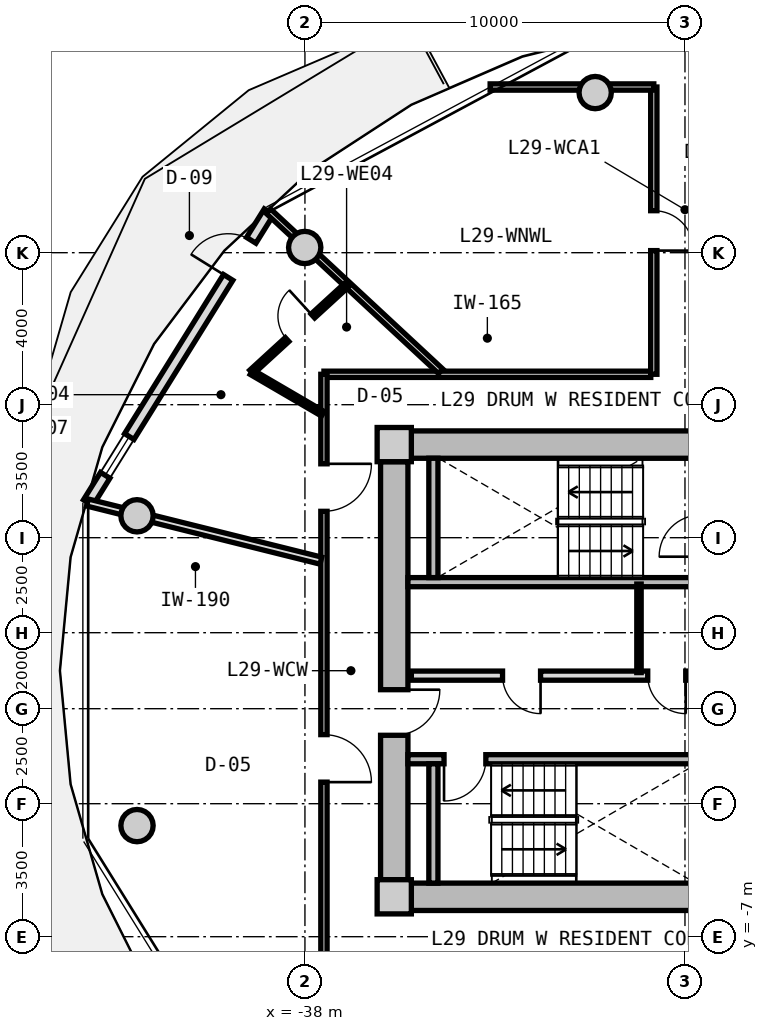
"""IFC4 building model, lengths in metres.
Left out: names, types, materials, properties, quantities, classifications, styles, units other than length and angle.
Written with IfcOpenShell. Run it as: python <this file> out.ifc"""

import sys

from ifc_helpers import new_model, si_unit, direction, frame, frame_2d, origin, origin_2d, place, context, subcontext, project, spatial, rectangle, circle, extrude, source, transform, mapped, element, fill, save


model = new_model("IFC4")
c1 = context("Model", 3, precision=1e-05, world=origin(), true_north=direction((0.0, 1.0)))
c2 = subcontext(c1, "Body", "Model", "MODEL_VIEW")
j1 = project(units=[si_unit("LENGTHUNIT", "METRE"), si_unit("PLANEANGLEUNIT", "RADIAN")], contexts=[c1])
p1 = place(None, origin())
s1 = spatial("IfcSite", under=j1, at=p1, CompositionType="ELEMENT")
p2 = place(p1, origin())
s2 = spatial("IfcBuilding", under=s1, at=p2, CompositionType="ELEMENT")
p3 = place(p2, frame((0.0, 0.0, 96.25)))
s3 = spatial("IfcBuildingStorey", under=s2, at=p3, CompositionType="ELEMENT", Elevation=96.25)
m1 = source(origin(), c2, "Body", "SweptSolid", [
    extrude(rectangle(XDim=0.9, YDim=0.9, at=origin_2d()), origin(), (0.0, 0.0, 1.0), 3.05),
])
for number, where, z_axis, x_axis in (
    (1, (-35.65, -5.95, 0.0), (0.0, 0.0, 1.0), (1.0, 0.0, 0.0)),
    (2, (-35.65, 5.95, 0.0), (0.0, 0.0, 1.0), (1.0, 0.0, 0.0)),
):
    element("IfcColumn", number, at=place(p3, frame(where, z_axis=z_axis, x_axis=x_axis)), inside=s3, PredefinedType="COLUMN", context=c2, shape_type="MappedRepresentation", body=[
        mapped(m1, transform((0.0, 0.0, 0.0), x_axis=(1.0, 0.0, 0.0), y_axis=(0.0, 1.0, 0.0), z_axis=(0.0, 0.0, 1.0), scale=1.0)),
    ])
m2 = source(origin(), c2, "Body", "SweptSolid", [
    extrude(rectangle(XDim=14.4, YDim=0.72, at=frame_2d((7.2, 0.0))), origin(), (0.0, 0.0, 1.0), 2.79),
])
for number, where, z_axis, x_axis in (
    (3, (-35.2, 5.95, 0.0), (0.0, 0.0, 1.0), (1.0, 0.0, 0.0)),
    (4, (-20.8, -5.95, 0.0), (0.0, 0.0, 1.0), (-1.0, 0.0, 0.0)),
):
    element("IfcWall", number, at=place(p3, frame(where, z_axis=z_axis, x_axis=x_axis)), inside=s3, PredefinedType="SHEAR", context=c2, shape_type="MappedRepresentation", body=[
        mapped(m2, transform((0.0, 0.0, 0.0), x_axis=(1.0, 0.0, 0.0), y_axis=(0.0, 1.0, 0.0), z_axis=(0.0, 0.0, 1.0), scale=1.0)),
    ])
m3 = source(origin(), c2, "Body", "SweptSolid", [
    extrude(rectangle(XDim=11.0, YDim=0.72, at=frame_2d((5.5, 0.0))), origin(), (0.0, 0.0, 1.0), 2.79),
])
p4 = place(p3, frame((-35.65, -5.5, 0.0), z_axis=(0.0, 0.0, 1.0), x_axis=(0.0, 1.0, 0.0)))
e5 = element("IfcWall", 5, at=p4, inside=s3, PredefinedType="SHEAR", context=c2, shape_type="MappedRepresentation", body=[
    mapped(m3, transform((0.0, 0.0, 0.0), x_axis=(1.0, 0.0, 0.0), y_axis=(0.0, 1.0, 0.0), z_axis=(0.0, 0.0, 1.0), scale=1.0)),
])
p5 = place(p4, frame((3.8, 0.0, 0.0)))
e6 = element("IfcOpeningElement", 6, at=p5, cuts=e5, PredefinedType="OPENING", context=c2, shape_type="SweptSolid", body=[
    extrude(rectangle(XDim=1.2, YDim=2.15, at=frame_2d((0.6, 1.075))), frame((0.0, 0.37, 0.0), z_axis=(0.0, -1.0, 0.0), x_axis=(1.0, 0.0, 0.0)), (0.0, 0.0, 1.0), 0.74),
])
m4 = source(origin(), c2, "Body", "SweptSolid", [
    extrude(circle(Radius=0.425, at=origin_2d()), origin(), (0.0, 0.0, 1.0), 3.05),
])
for number, where, z_axis, x_axis in (
    (7, (-30.363, 15.213, 0.0), (0.0, 0.0, 1.0), (1.0, 0.0, 0.0)),
    (8, (-38.006, 11.137, 0.0), (0.0, 0.0, 1.0), (1.0, 0.0, 0.0)),
    (9, (-42.419, 4.076, 0.0), (0.0, 0.0, 1.0), (1.0, 0.0, 0.0)),
    (10, (-42.419, -4.076, 0.0), (0.0, 0.0, 1.0), (1.0, 0.0, 0.0)),
):
    element("IfcColumn", number, at=place(p3, frame(where, z_axis=z_axis, x_axis=x_axis)), inside=s3, PredefinedType="COLUMN", context=c2, shape_type="MappedRepresentation", body=[
        mapped(m4, transform((0.0, 0.0, 0.0), x_axis=(1.0, 0.0, 0.0), y_axis=(0.0, 1.0, 0.0), z_axis=(0.0, 0.0, 1.0), scale=1.0)),
    ])
m5 = source(origin(), c2, "Body", "SweptSolid", [
    extrude(rectangle(XDim=9.014, YDim=0.29, at=frame_2d((4.507, 0.0))), origin(), (0.0, 0.0, 1.0), 2.79),
])
p6 = place(p3, frame((-43.704, 4.421, 0.0), z_axis=(0.0, 0.0, 1.0), x_axis=(0.527732945084, 0.849410347637, 0.0)))
e11 = element("IfcWall", 11, at=p6, inside=s3, PredefinedType="SOLIDWALL", context=c2, shape_type="MappedRepresentation", body=[
    mapped(m5, transform((0.0, 0.0, 0.0), x_axis=(1.0, 0.0, 0.0), y_axis=(0.0, 1.0, 0.0), z_axis=(0.0, 0.0, 1.0), scale=1.0)),
])
p7 = place(p6, frame((6.98, 0.0, 0.0)))
e12 = element("IfcOpeningElement", 12, at=p7, cuts=e11, PredefinedType="OPENING", context=c2, shape_type="SweptSolid", body=[
    extrude(rectangle(XDim=1.15, YDim=2.25, at=frame_2d((0.575, 1.125))), frame((0.0, 0.155, 0.0), z_axis=(0.0, -1.0, 0.0), x_axis=(1.0, 0.0, 0.0)), (0.0, 0.0, 1.0), 0.31),
])
p8 = place(p6, frame((0.85, 0.0, 0.85)))
e13 = element("IfcOpeningElement", 13, at=p8, cuts=e11, PredefinedType="OPENING", context=c2, shape_type="SweptSolid", body=[
    extrude(rectangle(XDim=1.2, YDim=1.5, at=frame_2d((0.6, 0.75))), frame((0.0, 0.155, 0.0), z_axis=(0.0, -1.0, 0.0), x_axis=(1.0, 0.0, 0.0)), (0.0, 0.0, 1.0), 0.31),
])
m6 = source(origin(), c2, "Body", "SweptSolid", [
    extrude(rectangle(XDim=7.83, YDim=0.24, at=frame_2d((3.915, 0.0))), origin(), (0.0, 0.0, 1.0), 2.79),
])
p9 = place(p3, frame((-35.29, 2.33, 0.0), z_axis=(0.0, 0.0, 1.0), x_axis=(1.0, 0.0, 0.0)))
e14 = element("IfcWall", 14, at=p9, inside=s3, PredefinedType="PARTITIONING", context=c2, shape_type="MappedRepresentation", body=[
    mapped(m6, transform((0.0, 0.0, 0.0), x_axis=(1.0, 0.0, 0.0), y_axis=(0.0, 1.0, 0.0), z_axis=(0.0, 0.0, 1.0), scale=1.0)),
])
m7 = source(origin(), c2, "Body", "SweptSolid", [
    extrude(rectangle(XDim=3.14, YDim=0.24, at=frame_2d((1.57, 0.0))), origin(), (0.0, 0.0, 1.0), 2.79),
])
p10 = place(p3, frame((-34.62, 2.45, 0.0), z_axis=(0.0, 0.0, 1.0), x_axis=(0.0, 1.0, 0.0)))
e15 = element("IfcWall", 15, at=p10, inside=s3, PredefinedType="PARTITIONING", context=c2, shape_type="MappedRepresentation", body=[
    mapped(m7, transform((0.0, 0.0, 0.0), x_axis=(1.0, 0.0, 0.0), y_axis=(0.0, 1.0, 0.0), z_axis=(0.0, 0.0, 1.0), scale=1.0)),
])
p11 = place(p3, frame((-35.29, -2.33, 0.0), z_axis=(0.0, 0.0, 1.0), x_axis=(1.0, 0.0, 0.0)))
e16 = element("IfcWall", 16, at=p11, inside=s3, PredefinedType="PARTITIONING", context=c2, shape_type="MappedRepresentation", body=[
    mapped(m6, transform((0.0, 0.0, 0.0), x_axis=(1.0, 0.0, 0.0), y_axis=(0.0, 1.0, 0.0), z_axis=(0.0, 0.0, 1.0), scale=1.0)),
])
p12 = place(p11, frame((0.95, 0.0, 0.0)))
e17 = element("IfcOpeningElement", 17, at=p12, cuts=e16, PredefinedType="OPENING", context=c2, shape_type="SweptSolid", body=[
    extrude(rectangle(XDim=1.1, YDim=2.15, at=frame_2d((0.55, 1.075))), frame((0.0, 0.13, 0.0), z_axis=(0.0, -1.0, 0.0), x_axis=(1.0, 0.0, 0.0)), (0.0, 0.0, 1.0), 0.26),
])
p13 = place(p3, frame((-34.62, -5.59, 0.0), z_axis=(0.0, 0.0, 1.0), x_axis=(0.0, 1.0, 0.0)))
e18 = element("IfcWall", 18, at=p13, inside=s3, PredefinedType="PARTITIONING", context=c2, shape_type="MappedRepresentation", body=[
    mapped(m7, transform((0.0, 0.0, 0.0), x_axis=(1.0, 0.0, 0.0), y_axis=(0.0, 1.0, 0.0), z_axis=(0.0, 0.0, 1.0), scale=1.0)),
])
m8 = source(origin(), c2, "Body", "SweptSolid", [
    extrude(rectangle(XDim=7.62, YDim=0.24, at=frame_2d((3.81, 0.0))), origin(), (0.0, 0.0, 1.0), 2.775),
])
p14 = place(p3, frame((-35.2, -0.13, 0.0), z_axis=(0.0, 0.0, 1.0), x_axis=(1.0, 0.0, 0.0)))
e19 = element("IfcWall", 19, at=p14, inside=s3, PredefinedType="PARTITIONING", context=c2, shape_type="MappedRepresentation", body=[
    mapped(m8, transform((0.0, 0.0, 0.0), x_axis=(1.0, 0.0, 0.0), y_axis=(0.0, 1.0, 0.0), z_axis=(0.0, 0.0, 1.0), scale=1.0)),
])
p15 = place(p14, frame((6.22, 0.0, 0.0)))
e20 = element("IfcOpeningElement", 20, at=p15, cuts=e19, PredefinedType="OPENING", context=c2, shape_type="SweptSolid", body=[
    extrude(rectangle(XDim=1.0, YDim=2.1, at=frame_2d((0.5, 1.05))), frame((0.0, 0.13, 0.0), z_axis=(0.0, -1.0, 0.0), x_axis=(1.0, 0.0, 0.0)), (0.0, 0.0, 1.0), 0.26),
])
p16 = place(p14, frame((2.4, 0.0, 0.0)))
e21 = element("IfcOpeningElement", 21, at=p16, cuts=e19, PredefinedType="OPENING", context=c2, shape_type="SweptSolid", body=[
    extrude(rectangle(XDim=1.0, YDim=2.1, at=frame_2d((0.5, 1.05))), frame((0.0, 0.13, 0.0), z_axis=(0.0, -1.0, 0.0), x_axis=(1.0, 0.0, 0.0)), (0.0, 0.0, 1.0), 0.26),
])
m9 = source(origin(), c2, "Body", "SweptSolid", [
    extrude(rectangle(XDim=2.33, YDim=0.115, at=frame_2d((1.165, 0.0))), origin(), (0.0, 0.0, 1.0), 2.775),
])
p17 = place(p3, frame((-29.21, -0.05, 0.0), z_axis=(0.0, 0.0, 1.0), x_axis=(0.0, 1.0, 0.0)))
e22 = element("IfcWall", 22, at=p17, inside=s3, PredefinedType="PARTITIONING", context=c2, shape_type="MappedRepresentation", body=[
    mapped(m9, transform((0.0, 0.0, 0.0), x_axis=(1.0, 0.0, 0.0), y_axis=(0.0, 1.0, 0.0), z_axis=(0.0, 0.0, 1.0), scale=1.0)),
])
m10 = source(origin(), c2, "Body", "SweptSolid", [
    extrude(rectangle(XDim=8.6, YDim=0.165, at=frame_2d((4.3, 0.0))), origin(), (0.0, 0.0, 1.0), 2.775),
])
p18 = place(p3, frame((-37.5, 7.8, 0.0), z_axis=(0.0, 0.0, 1.0), x_axis=(1.0, 0.0, 0.0)))
e23 = element("IfcWall", 23, at=p18, inside=s3, PredefinedType="PARTITIONING", context=c2, shape_type="MappedRepresentation", body=[
    mapped(m10, transform((0.0, 0.0, 0.0), x_axis=(1.0, 0.0, 0.0), y_axis=(0.0, 1.0, 0.0), z_axis=(0.0, 0.0, 1.0), scale=1.0)),
])
m11 = source(origin(), c2, "Body", "SweptSolid", [
    extrude(rectangle(XDim=15.6, YDim=0.165, at=frame_2d((7.8, 0.0))), origin(), (0.0, 0.0, 1.0), 2.775),
])
p19 = place(p3, frame((-37.5, -7.8, 0.0), z_axis=(0.0, 0.0, 1.0), x_axis=(0.0, 1.0, 0.0)))
e24 = element("IfcWall", 24, at=p19, inside=s3, PredefinedType="PARTITIONING", context=c2, shape_type="MappedRepresentation", body=[
    mapped(m11, transform((0.0, 0.0, 0.0), x_axis=(1.0, 0.0, 0.0), y_axis=(0.0, 1.0, 0.0), z_axis=(0.0, 0.0, 1.0), scale=1.0)),
])
p20 = place(p19, frame((11.994, 0.0, 0.0)))
e25 = element("IfcOpeningElement", 25, at=p20, cuts=e24, PredefinedType="OPENING", context=c2, shape_type="SweptSolid", body=[
    extrude(rectangle(XDim=1.25, YDim=2.2, at=frame_2d((0.625, 1.1))), frame((0.0, 0.093, 0.0), z_axis=(0.0, -1.0, 0.0), x_axis=(1.0, 0.0, 0.0)), (0.0, 0.0, 1.0), 0.185),
])
p21 = place(p19, frame((4.867, 0.0, 0.0)))
e26 = element("IfcOpeningElement", 26, at=p21, cuts=e24, PredefinedType="OPENING", context=c2, shape_type="SweptSolid", body=[
    extrude(rectangle(XDim=1.25, YDim=2.2, at=frame_2d((0.625, 1.1))), frame((0.0, 0.093, 0.0), z_axis=(0.0, -1.0, 0.0), x_axis=(1.0, 0.0, 0.0)), (0.0, 0.0, 1.0), 0.185),
])
m12 = source(origin(), c2, "Body", "SweptSolid", [
    extrude(rectangle(XDim=6.187, YDim=0.165, at=frame_2d((3.093, 0.0))), origin(), (0.0, 0.0, 1.0), 2.275),
])
p22 = place(p3, frame((-34.429, 7.88, 0.0), z_axis=(0.0, 0.0, 1.0), x_axis=(-0.732501077882, 0.680765870841, 0.0)))
e27 = element("IfcWall", 27, at=p22, inside=s3, PredefinedType="PARTITIONING", context=c2, shape_type="MappedRepresentation", body=[
    mapped(m12, transform((0.0, 0.0, 0.0), x_axis=(1.0, 0.0, 0.0), y_axis=(0.0, 1.0, 0.0), z_axis=(0.0, 0.0, 1.0), scale=1.0)),
])
m13 = source(origin(), c2, "Body", "SweptSolid", [
    extrude(rectangle(XDim=7.56, YDim=0.165, at=frame_2d((3.78, 0.0))), origin(), (0.0, 0.0, 1.0), 2.775),
])
p23 = place(p3, frame((-28.82, 7.8, 0.0), z_axis=(0.0, 0.0, 1.0), x_axis=(0.0, 1.0, 0.0)))
e28 = element("IfcWall", 28, at=p23, inside=s3, PredefinedType="PARTITIONING", context=c2, shape_type="MappedRepresentation", body=[
    mapped(m13, transform((0.0, 0.0, 0.0), x_axis=(1.0, 0.0, 0.0), y_axis=(0.0, 1.0, 0.0), z_axis=(0.0, 0.0, 1.0), scale=1.0)),
])
p24 = place(p23, frame((3.255, 0.0, 0.0)))
e29 = element("IfcOpeningElement", 29, at=p24, cuts=e28, PredefinedType="OPENING", context=c2, shape_type="SweptSolid", body=[
    extrude(rectangle(XDim=1.05, YDim=2.15, at=frame_2d((0.525, 1.075))), frame((0.0, 0.093, 0.0), z_axis=(0.0, -1.0, 0.0), x_axis=(1.0, 0.0, 0.0)), (0.0, 0.0, 1.0), 0.185),
])
m14 = source(origin(), c2, "Body", "SweptSolid", [
    extrude(rectangle(XDim=4.307, YDim=0.165, at=frame_2d((2.153, 0.0))), origin(), (0.0, 0.0, 1.0), 2.275),
])
p25 = place(p3, frame((-33.127, 15.36, 0.0), z_axis=(0.0, 0.0, 1.0), x_axis=(1.0, 0.0, 0.0)))
e30 = element("IfcWall", 30, at=p25, inside=s3, PredefinedType="PARTITIONING", context=c2, shape_type="MappedRepresentation", body=[
    mapped(m14, transform((0.0, 0.0, 0.0), x_axis=(1.0, 0.0, 0.0), y_axis=(0.0, 1.0, 0.0), z_axis=(0.0, 0.0, 1.0), scale=1.0)),
])
m15 = source(origin(), c2, "Body", "SweptSolid", [
    extrude(rectangle(XDim=6.331, YDim=0.19, at=frame_2d((3.165, 0.0))), origin(), (0.0, 0.0, 1.0), 2.275),
])
p26 = place(p3, frame((-37.58, 2.896, 0.0), z_axis=(0.0, 0.0, 1.0), x_axis=(-0.97036440661, 0.241646267062, 0.0)))
e31 = element("IfcWall", 31, at=p26, inside=s3, PredefinedType="PARTITIONING", context=c2, shape_type="MappedRepresentation", body=[
    mapped(m15, transform((0.0, 0.0, 0.0), x_axis=(1.0, 0.0, 0.0), y_axis=(0.0, 1.0, 0.0), z_axis=(0.0, 0.0, 1.0), scale=1.0)),
])
m16 = source(origin(), c2, "Body", "SweptSolid", [
    extrude(rectangle(XDim=2.172, YDim=0.14, at=frame_2d((1.086, 0.0))), origin(), (0.0, 0.0, 1.0), 2.775),
])
p27 = place(p3, frame((-37.53, 6.762, 0.0), z_axis=(0.0, 0.0, 1.0), x_axis=(-0.863562702562, 0.504241468688, 0.0)))
e32 = element("IfcWall", 32, at=p27, inside=s3, PredefinedType="PARTITIONING", context=c2, shape_type="MappedRepresentation", body=[
    mapped(m16, transform((0.0, 0.0, 0.0), x_axis=(1.0, 0.0, 0.0), y_axis=(0.0, 1.0, 0.0), z_axis=(0.0, 0.0, 1.0), scale=1.0)),
])
m17 = source(origin(), c2, "Body", "SweptSolid", [
    extrude(rectangle(XDim=3.457, YDim=0.14, at=frame_2d((1.729, 0.0))), origin(), (0.0, 0.0, 1.0), 2.775),
])
p28 = place(p3, frame((-39.405, 7.857, 0.0), z_axis=(0.0, 0.0, 1.0), x_axis=(0.737567375492, 0.675273549467, 0.0)))
e33 = element("IfcWall", 33, at=p28, inside=s3, PredefinedType="PARTITIONING", context=c2, shape_type="MappedRepresentation", body=[
    mapped(m17, transform((0.0, 0.0, 0.0), x_axis=(1.0, 0.0, 0.0), y_axis=(0.0, 1.0, 0.0), z_axis=(0.0, 0.0, 1.0), scale=1.0)),
])
p29 = place(p28, frame((1.268, 0.0, 0.0)))
e34 = element("IfcOpeningElement", 34, at=p29, cuts=e33, PredefinedType="OPENING", context=c2, shape_type="SweptSolid", body=[
    extrude(rectangle(XDim=0.92, YDim=2.1, at=frame_2d((0.46, 1.05))), frame((0.0, 0.08, 0.0), z_axis=(0.0, -1.0, 0.0), x_axis=(1.0, 0.0, 0.0)), (0.0, 0.0, 1.0), 0.16),
])
m18 = source(origin(), c2, "Body", "SweptSolid", [
    extrude(rectangle(XDim=1.15, YDim=2.25, at=frame_2d((0.575, 1.125))), frame((0.0, 0.025, 0.0), z_axis=(0.0, -1.0, 0.0), x_axis=(1.0, 0.0, 0.0)), (0.0, 0.0, 1.0), 0.05),
])
p30 = place(p7, origin())
e35 = element("IfcDoor", 35, at=p30, inside=s3, OperationType="SINGLE_SWING_LEFT", PredefinedType="DOOR", context=c2, shape_type="MappedRepresentation", body=[
    mapped(m18, transform((0.0, 0.0, 0.0), x_axis=(1.0, 0.0, 0.0), y_axis=(0.0, 1.0, 0.0), z_axis=(0.0, 0.0, 1.0), scale=1.0)),
])
fill(e12, e35)
m19 = source(origin(), c2, "Body", "SweptSolid", [
    extrude(rectangle(XDim=1.2, YDim=1.5, at=frame_2d((0.6, 0.75))), frame((0.0, 0.03, 0.0), z_axis=(0.0, -1.0, 0.0), x_axis=(1.0, 0.0, 0.0)), (0.0, 0.0, 1.0), 0.06),
])
p31 = place(p8, origin())
e36 = element("IfcWindow", 36, at=p31, inside=s3, PartitioningType="SINGLE_PANEL", PredefinedType="WINDOW", context=c2, shape_type="MappedRepresentation", body=[
    mapped(m19, transform((0.0, 0.0, 0.0), x_axis=(1.0, 0.0, 0.0), y_axis=(0.0, 1.0, 0.0), z_axis=(0.0, 0.0, 1.0), scale=1.0)),
])
fill(e13, e36)
m20 = source(origin(), c2, "Body", "SweptSolid", [
    extrude(rectangle(XDim=1.1, YDim=2.15, at=frame_2d((0.55, 1.075))), frame((0.0, 0.025, 0.0), z_axis=(0.0, -1.0, 0.0), x_axis=(1.0, 0.0, 0.0)), (0.0, 0.0, 1.0), 0.05),
])
p32 = place(p12, frame((1.1, 0.0, 0.0), z_axis=(0.0, 0.0, 1.0), x_axis=(-1.0, 0.0, 0.0)))
e37 = element("IfcDoor", 37, at=p32, inside=s3, OperationType="SINGLE_SWING_RIGHT", PredefinedType="DOOR", context=c2, shape_type="MappedRepresentation", body=[
    mapped(m20, transform((0.0, 0.0, 0.0), x_axis=(1.0, 0.0, 0.0), y_axis=(0.0, 1.0, 0.0), z_axis=(0.0, 0.0, 1.0), scale=1.0)),
])
fill(e17, e37)
m21 = source(origin(), c2, "Body", "SweptSolid", [
    extrude(rectangle(XDim=1.2, YDim=2.15, at=frame_2d((0.6, 1.075))), frame((0.0, 0.025, 0.0), z_axis=(0.0, -1.0, 0.0), x_axis=(1.0, 0.0, 0.0)), (0.0, 0.0, 1.0), 0.05),
])
p33 = place(p5, frame((1.2, 0.0, 0.0), z_axis=(0.0, 0.0, 1.0), x_axis=(-1.0, 0.0, 0.0)))
e38 = element("IfcDoor", 38, at=p33, inside=s3, OperationType="SINGLE_SWING_LEFT", PredefinedType="DOOR", context=c2, shape_type="MappedRepresentation", body=[
    mapped(m21, transform((0.0, 0.0, 0.0), x_axis=(1.0, 0.0, 0.0), y_axis=(0.0, 1.0, 0.0), z_axis=(0.0, 0.0, 1.0), scale=1.0)),
])
fill(e6, e38)
m22 = source(origin(), c2, "Body", "SweptSolid", [
    extrude(rectangle(XDim=1.0, YDim=2.1, at=frame_2d((0.5, 1.05))), frame((0.0, 0.025, 0.0), z_axis=(0.0, -1.0, 0.0), x_axis=(1.0, 0.0, 0.0)), (0.0, 0.0, 1.0), 0.05),
])
p34 = place(p15, frame((1.0, 0.0, 0.0), z_axis=(0.0, 0.0, 1.0), x_axis=(-1.0, 0.0, 0.0)))
e39 = element("IfcDoor", 39, at=p34, inside=s3, OperationType="SINGLE_SWING_LEFT", PredefinedType="DOOR", context=c2, shape_type="MappedRepresentation", body=[
    mapped(m22, transform((0.0, 0.0, 0.0), x_axis=(1.0, 0.0, 0.0), y_axis=(0.0, 1.0, 0.0), z_axis=(0.0, 0.0, 1.0), scale=1.0)),
])
fill(e20, e39)
p35 = place(p16, frame((1.0, 0.0, 0.0), z_axis=(0.0, 0.0, 1.0), x_axis=(-1.0, 0.0, 0.0)))
e40 = element("IfcDoor", 40, at=p35, inside=s3, OperationType="SINGLE_SWING_LEFT", PredefinedType="DOOR", context=c2, shape_type="MappedRepresentation", body=[
    mapped(m22, transform((0.0, 0.0, 0.0), x_axis=(1.0, 0.0, 0.0), y_axis=(0.0, 1.0, 0.0), z_axis=(0.0, 0.0, 1.0), scale=1.0)),
])
fill(e21, e40)
m23 = source(origin(), c2, "Body", "SweptSolid", [
    extrude(rectangle(XDim=1.05, YDim=2.15, at=frame_2d((0.525, 1.075))), frame((0.0, 0.025, 0.0), z_axis=(0.0, -1.0, 0.0), x_axis=(1.0, 0.0, 0.0)), (0.0, 0.0, 1.0), 0.05),
])
p36 = place(p24, frame((1.05, 0.0, 0.0), z_axis=(0.0, 0.0, 1.0), x_axis=(-1.0, 0.0, 0.0)))
e41 = element("IfcDoor", 41, at=p36, inside=s3, OperationType="SINGLE_SWING_RIGHT", PredefinedType="DOOR", context=c2, shape_type="MappedRepresentation", body=[
    mapped(m23, transform((0.0, 0.0, 0.0), x_axis=(1.0, 0.0, 0.0), y_axis=(0.0, 1.0, 0.0), z_axis=(0.0, 0.0, 1.0), scale=1.0)),
])
fill(e29, e41)
m24 = source(origin(), c2, "Body", "SweptSolid", [
    extrude(rectangle(XDim=1.25, YDim=2.2, at=frame_2d((0.625, 1.1))), frame((0.0, 0.025, 0.0), z_axis=(0.0, -1.0, 0.0), x_axis=(1.0, 0.0, 0.0)), (0.0, 0.0, 1.0), 0.05),
])
p37 = place(p20, frame((1.25, 0.0, 0.0), z_axis=(0.0, 0.0, 1.0), x_axis=(-1.0, 0.0, 0.0)))
e42 = element("IfcDoor", 42, at=p37, inside=s3, OperationType="SINGLE_SWING_LEFT", PredefinedType="DOOR", context=c2, shape_type="MappedRepresentation", body=[
    mapped(m24, transform((0.0, 0.0, 0.0), x_axis=(1.0, 0.0, 0.0), y_axis=(0.0, 1.0, 0.0), z_axis=(0.0, 0.0, 1.0), scale=1.0)),
])
fill(e25, e42)
m25 = source(origin(), c2, "Body", "SweptSolid", [
    extrude(rectangle(XDim=0.92, YDim=2.1, at=frame_2d((0.46, 1.05))), frame((0.0, 0.025, 0.0), z_axis=(0.0, -1.0, 0.0), x_axis=(1.0, 0.0, 0.0)), (0.0, 0.0, 1.0), 0.05),
])
p38 = place(p29, origin())
e43 = element("IfcDoor", 43, at=p38, inside=s3, OperationType="SINGLE_SWING_RIGHT", PredefinedType="DOOR", context=c2, shape_type="MappedRepresentation", body=[
    mapped(m25, transform((0.0, 0.0, 0.0), x_axis=(1.0, 0.0, 0.0), y_axis=(0.0, 1.0, 0.0), z_axis=(0.0, 0.0, 1.0), scale=1.0)),
])
fill(e34, e43)
p39 = place(p21, frame((1.25, 0.0, 0.0), z_axis=(0.0, 0.0, 1.0), x_axis=(-1.0, 0.0, 0.0)))
e44 = element("IfcDoor", 44, at=p39, inside=s3, OperationType="SINGLE_SWING_RIGHT", PredefinedType="DOOR", context=c2, shape_type="MappedRepresentation", body=[
    mapped(m24, transform((0.0, 0.0, 0.0), x_axis=(1.0, 0.0, 0.0), y_axis=(0.0, 1.0, 0.0), z_axis=(0.0, 0.0, 1.0), scale=1.0)),
])
fill(e26, e44)
save(model, sys.argv[1])
